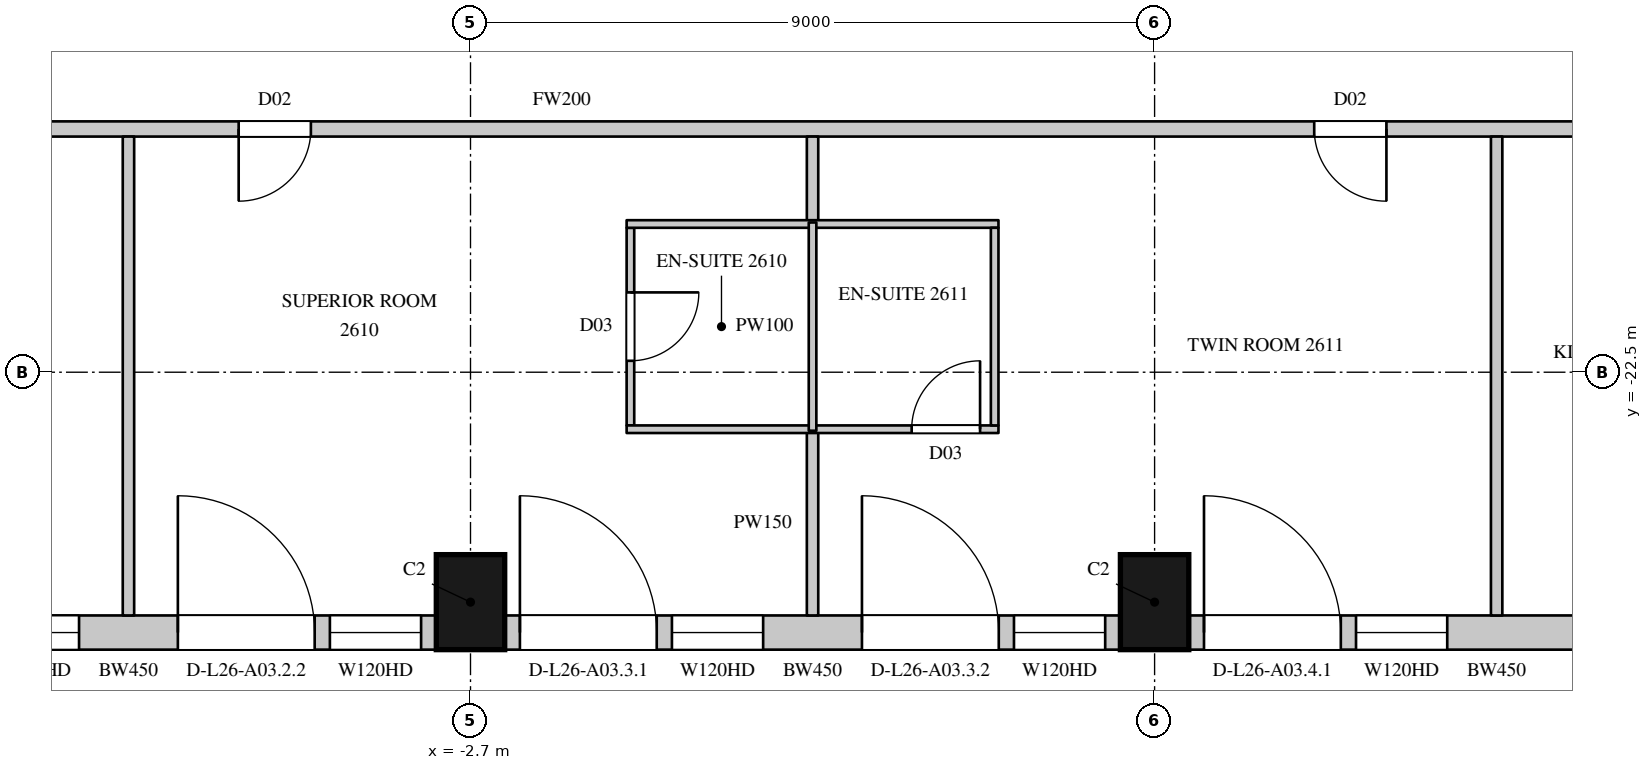
"""IFC4 building model, lengths in metres.
Left out: names, types, materials, properties, quantities, classifications, styles, units other than length and angle.
Written with IfcOpenShell. Run it as: python <this file> out.ifc"""

import sys

from ifc_helpers import new_model, si_unit, direction, frame, frame_2d, origin, origin_2d, place, context, subcontext, project, spatial, rectangle, extrude, element, fill, save


model = new_model("IFC4")
c1 = context("Model", 3, precision=1e-05, world=origin(), true_north=direction((0.0, 1.0)))
c2 = subcontext(c1, "Body", "Model", "MODEL_VIEW")
j1 = project(units=[si_unit("LENGTHUNIT", "METRE"), si_unit("PLANEANGLEUNIT", "RADIAN")], contexts=[c1])
p1 = place(None, origin())
s1 = spatial("IfcSite", under=j1, at=p1, CompositionType="ELEMENT")
p2 = place(p1, origin())
s2 = spatial("IfcBuilding", under=s1, at=p2, CompositionType="ELEMENT")
p3 = place(p2, frame((0.0, 0.0, 123.9)))
s3 = spatial("IfcBuildingStorey", under=s2, at=p3, CompositionType="ELEMENT", Elevation=123.9)
for number, where, z_axis, x_axis in (
    (1, (-2.7, -25.525, 0.0), (0.0, 0.0, 1.0), (1.0, 0.0, 0.0)),
    (2, (6.3, -25.525, 0.0), (0.0, 0.0, 1.0), (1.0, 0.0, 0.0)),
):
    element("IfcColumn", number, at=place(p3, frame(where, z_axis=z_axis, x_axis=x_axis)), inside=s3, PredefinedType="COLUMN", context=c2, shape_type="SweptSolid", body=[
        extrude(rectangle(XDim=0.9, YDim=1.25, at=origin_2d()), origin(), (0.0, 0.0, 1.0), 3.6),
    ])
p4 = place(p3, frame((-11.25, -25.925, 0.0), z_axis=(0.0, 0.0, 1.0), x_axis=(1.0, 0.0, 0.0)))
e3 = element("IfcWall", 3, at=p4, inside=s3, PredefinedType="SOLIDWALL", context=c2, shape_type="SweptSolid", body=[
    extrude(rectangle(XDim=8.1, YDim=0.45, at=frame_2d((4.05, 0.0))), origin(), (0.0, 0.0, 1.0), 3.3),
])
p5 = place(p4, frame((0.2, 0.0, 0.0)))
e4 = element("IfcOpeningElement", 4, at=p5, cuts=e3, PredefinedType="OPENING", context=c2, shape_type="SweptSolid", body=[
    extrude(rectangle(XDim=1.8, YDim=2.4, at=frame_2d((0.9, 1.2))), frame((0.0, 0.235, 0.0), z_axis=(0.0, -1.0, 0.0), x_axis=(1.0, 0.0, 0.0)), (0.0, 0.0, 1.0), 0.47),
])
p6 = place(p4, frame((2.2, 0.0, 1.05)))
e5 = element("IfcOpeningElement", 5, at=p6, cuts=e3, PredefinedType="OPENING", context=c2, shape_type="SweptSolid", body=[
    extrude(rectangle(XDim=1.2, YDim=2.0, at=frame_2d((0.6, 1.0))), frame((0.0, 0.235, 0.0), z_axis=(0.0, -1.0, 0.0), x_axis=(1.0, 0.0, 0.0)), (0.0, 0.0, 1.0), 0.47),
])
p7 = place(p4, frame((4.7, 0.0, 0.0)))
e6 = element("IfcOpeningElement", 6, at=p7, cuts=e3, PredefinedType="OPENING", context=c2, shape_type="SweptSolid", body=[
    extrude(rectangle(XDim=1.8, YDim=2.4, at=frame_2d((0.9, 1.2))), frame((0.0, 0.235, 0.0), z_axis=(0.0, -1.0, 0.0), x_axis=(1.0, 0.0, 0.0)), (0.0, 0.0, 1.0), 0.47),
])
p8 = place(p4, frame((6.7, 0.0, 1.05)))
e7 = element("IfcOpeningElement", 7, at=p8, cuts=e3, PredefinedType="OPENING", context=c2, shape_type="SweptSolid", body=[
    extrude(rectangle(XDim=1.2, YDim=2.0, at=frame_2d((0.6, 1.0))), frame((0.0, 0.235, 0.0), z_axis=(0.0, -1.0, 0.0), x_axis=(1.0, 0.0, 0.0)), (0.0, 0.0, 1.0), 0.47),
])
p9 = place(p3, frame((-2.25, -25.925, 0.0), z_axis=(0.0, 0.0, 1.0), x_axis=(1.0, 0.0, 0.0)))
e8 = element("IfcWall", 8, at=p9, inside=s3, PredefinedType="SOLIDWALL", context=c2, shape_type="SweptSolid", body=[
    extrude(rectangle(XDim=8.1, YDim=0.45, at=frame_2d((4.05, 0.0))), origin(), (0.0, 0.0, 1.0), 3.3),
])
p10 = place(p9, frame((0.2, 0.0, 0.0)))
e9 = element("IfcOpeningElement", 9, at=p10, cuts=e8, PredefinedType="OPENING", context=c2, shape_type="SweptSolid", body=[
    extrude(rectangle(XDim=1.8, YDim=2.4, at=frame_2d((0.9, 1.2))), frame((0.0, 0.235, 0.0), z_axis=(0.0, -1.0, 0.0), x_axis=(1.0, 0.0, 0.0)), (0.0, 0.0, 1.0), 0.47),
])
p11 = place(p9, frame((2.2, 0.0, 1.05)))
e10 = element("IfcOpeningElement", 10, at=p11, cuts=e8, PredefinedType="OPENING", context=c2, shape_type="SweptSolid", body=[
    extrude(rectangle(XDim=1.2, YDim=2.0, at=frame_2d((0.6, 1.0))), frame((0.0, 0.235, 0.0), z_axis=(0.0, -1.0, 0.0), x_axis=(1.0, 0.0, 0.0)), (0.0, 0.0, 1.0), 0.47),
])
p12 = place(p9, frame((4.7, 0.0, 0.0)))
e11 = element("IfcOpeningElement", 11, at=p12, cuts=e8, PredefinedType="OPENING", context=c2, shape_type="SweptSolid", body=[
    extrude(rectangle(XDim=1.8, YDim=2.4, at=frame_2d((0.9, 1.2))), frame((0.0, 0.235, 0.0), z_axis=(0.0, -1.0, 0.0), x_axis=(1.0, 0.0, 0.0)), (0.0, 0.0, 1.0), 0.47),
])
p13 = place(p9, frame((6.7, 0.0, 1.05)))
e12 = element("IfcOpeningElement", 12, at=p13, cuts=e8, PredefinedType="OPENING", context=c2, shape_type="SweptSolid", body=[
    extrude(rectangle(XDim=1.2, YDim=2.0, at=frame_2d((0.6, 1.0))), frame((0.0, 0.235, 0.0), z_axis=(0.0, -1.0, 0.0), x_axis=(1.0, 0.0, 0.0)), (0.0, 0.0, 1.0), 0.47),
])
p14 = place(p3, frame((6.75, -25.925, 0.0), z_axis=(0.0, 0.0, 1.0), x_axis=(1.0, 0.0, 0.0)))
e13 = element("IfcWall", 13, at=p14, inside=s3, PredefinedType="SOLIDWALL", context=c2, shape_type="SweptSolid", body=[
    extrude(rectangle(XDim=8.1, YDim=0.45, at=frame_2d((4.05, 0.0))), origin(), (0.0, 0.0, 1.0), 3.3),
])
p15 = place(p14, frame((0.2, 0.0, 0.0)))
e14 = element("IfcOpeningElement", 14, at=p15, cuts=e13, PredefinedType="OPENING", context=c2, shape_type="SweptSolid", body=[
    extrude(rectangle(XDim=1.8, YDim=2.4, at=frame_2d((0.9, 1.2))), frame((0.0, 0.235, 0.0), z_axis=(0.0, -1.0, 0.0), x_axis=(1.0, 0.0, 0.0)), (0.0, 0.0, 1.0), 0.47),
])
p16 = place(p14, frame((2.2, 0.0, 1.05)))
e15 = element("IfcOpeningElement", 15, at=p16, cuts=e13, PredefinedType="OPENING", context=c2, shape_type="SweptSolid", body=[
    extrude(rectangle(XDim=1.2, YDim=2.0, at=frame_2d((0.6, 1.0))), frame((0.0, 0.235, 0.0), z_axis=(0.0, -1.0, 0.0), x_axis=(1.0, 0.0, 0.0)), (0.0, 0.0, 1.0), 0.47),
])
p17 = place(p14, frame((5.4, 0.0, 0.0)))
e16 = element("IfcOpeningElement", 16, at=p17, cuts=e13, PredefinedType="OPENING", context=c2, shape_type="SweptSolid", body=[
    extrude(rectangle(XDim=1.8, YDim=2.4, at=frame_2d((0.9, 1.2))), frame((0.0, 0.235, 0.0), z_axis=(0.0, -1.0, 0.0), x_axis=(1.0, 0.0, 0.0)), (0.0, 0.0, 1.0), 0.47),
])
p18 = place(p3, frame((-20.8, -19.3, 0.0), z_axis=(0.0, 0.0, 1.0), x_axis=(1.0, 0.0, 0.0)))
e17 = element("IfcWall", 17, at=p18, inside=s3, PredefinedType="PARTITIONING", context=c2, shape_type="SweptSolid", body=[
    extrude(rectangle(XDim=38.6, YDim=0.2, at=frame_2d((19.3, 0.0))), origin(), (0.0, 0.0, 1.0), 3.3),
])
p19 = place(p18, frame((11.2, 0.0, 0.0)))
e18 = element("IfcOpeningElement", 18, at=p19, cuts=e17, PredefinedType="OPENING", context=c2, shape_type="SweptSolid", body=[
    extrude(rectangle(XDim=0.95, YDim=2.2, at=frame_2d((0.475, 1.1))), frame((0.0, 0.11, 0.0), z_axis=(0.0, -1.0, 0.0), x_axis=(1.0, 0.0, 0.0)), (0.0, 0.0, 1.0), 0.22),
])
p20 = place(p18, frame((15.05, 0.0, 0.0)))
e19 = element("IfcOpeningElement", 19, at=p20, cuts=e17, PredefinedType="OPENING", context=c2, shape_type="SweptSolid", body=[
    extrude(rectangle(XDim=0.95, YDim=2.2, at=frame_2d((0.475, 1.1))), frame((0.0, 0.11, 0.0), z_axis=(0.0, -1.0, 0.0), x_axis=(1.0, 0.0, 0.0)), (0.0, 0.0, 1.0), 0.22),
])
p21 = place(p18, frame((29.2, 0.0, 0.0)))
e20 = element("IfcOpeningElement", 20, at=p21, cuts=e17, PredefinedType="OPENING", context=c2, shape_type="SweptSolid", body=[
    extrude(rectangle(XDim=0.95, YDim=2.2, at=frame_2d((0.475, 1.1))), frame((0.0, 0.11, 0.0), z_axis=(0.0, -1.0, 0.0), x_axis=(1.0, 0.0, 0.0)), (0.0, 0.0, 1.0), 0.22),
])
p22 = place(p18, frame((33.05, 0.0, 0.0)))
e21 = element("IfcOpeningElement", 21, at=p22, cuts=e17, PredefinedType="OPENING", context=c2, shape_type="SweptSolid", body=[
    extrude(rectangle(XDim=0.95, YDim=2.2, at=frame_2d((0.475, 1.1))), frame((0.0, 0.11, 0.0), z_axis=(0.0, -1.0, 0.0), x_axis=(1.0, 0.0, 0.0)), (0.0, 0.0, 1.0), 0.22),
])
p23 = place(p3, frame((-7.2, -25.7, 0.0), z_axis=(0.0, 0.0, 1.0), x_axis=(0.0, 1.0, 0.0)))
e22 = element("IfcWall", 22, at=p23, inside=s3, PredefinedType="PARTITIONING", context=c2, shape_type="SweptSolid", body=[
    extrude(rectangle(XDim=6.3, YDim=0.15, at=frame_2d((3.15, 0.0))), origin(), (0.0, 0.0, 1.0), 2.65),
])
p24 = place(p3, frame((1.8, -25.7, 0.0), z_axis=(0.0, 0.0, 1.0), x_axis=(0.0, 1.0, 0.0)))
e23 = element("IfcWall", 23, at=p24, inside=s3, PredefinedType="PARTITIONING", context=c2, shape_type="SweptSolid", body=[
    extrude(rectangle(XDim=2.43, YDim=0.15, at=frame_2d((1.215, 0.0))), origin(), (0.0, 0.0, 1.0), 2.65),
])
p25 = place(p3, frame((1.8, -20.53, 0.0), z_axis=(0.0, 0.0, 1.0), x_axis=(0.0, 1.0, 0.0)))
e24 = element("IfcWall", 24, at=p25, inside=s3, PredefinedType="PARTITIONING", context=c2, shape_type="SweptSolid", body=[
    extrude(rectangle(XDim=1.13, YDim=0.15, at=frame_2d((0.565, 0.0))), origin(), (0.0, 0.0, 1.0), 2.65),
])
p26 = place(p3, frame((10.8, -25.7, 0.0), z_axis=(0.0, 0.0, 1.0), x_axis=(0.0, 1.0, 0.0)))
e25 = element("IfcWall", 25, at=p26, inside=s3, PredefinedType="PARTITIONING", context=c2, shape_type="SweptSolid", body=[
    extrude(rectangle(XDim=6.3, YDim=0.15, at=frame_2d((3.15, 0.0))), origin(), (0.0, 0.0, 1.0), 2.65),
])
p27 = place(p3, frame((-0.596, -23.2, 0.0), z_axis=(0.0, 0.0, 1.0), x_axis=(0.0, 1.0, 0.0)))
e26 = element("IfcWall", 26, at=p27, inside=s3, PredefinedType="PARTITIONING", context=c2, shape_type="SweptSolid", body=[
    extrude(rectangle(XDim=2.6, YDim=0.1, at=frame_2d((1.3, 0.0))), origin(), (0.0, 0.0, 1.0), 3.3),
])
p28 = place(p27, frame((0.85, 0.0, 0.0)))
e27 = element("IfcOpeningElement", 27, at=p28, cuts=e26, PredefinedType="OPENING", context=c2, shape_type="SweptSolid", body=[
    extrude(rectangle(XDim=0.9, YDim=2.2, at=frame_2d((0.45, 1.1))), frame((0.0, 0.06, 0.0), z_axis=(0.0, -1.0, 0.0), x_axis=(1.0, 0.0, 0.0)), (0.0, 0.0, 1.0), 0.12),
])
p29 = place(p3, frame((-0.646, -23.25, 0.0), z_axis=(0.0, 0.0, 1.0), x_axis=(1.0, 0.0, 0.0)))
e28 = element("IfcWall", 28, at=p29, inside=s3, PredefinedType="PARTITIONING", context=c2, shape_type="SweptSolid", body=[
    extrude(rectangle(XDim=4.892, YDim=0.1, at=frame_2d((2.446, 0.0))), origin(), (0.0, 0.0, 1.0), 3.3),
])
p30 = place(p29, frame((3.75, 0.0, 0.0)))
e29 = element("IfcOpeningElement", 29, at=p30, cuts=e28, PredefinedType="OPENING", context=c2, shape_type="SweptSolid", body=[
    extrude(rectangle(XDim=0.9, YDim=2.2, at=frame_2d((0.45, 1.1))), frame((0.0, 0.06, 0.0), z_axis=(0.0, -1.0, 0.0), x_axis=(1.0, 0.0, 0.0)), (0.0, 0.0, 1.0), 0.12),
])
p31 = place(p3, frame((-0.646, -20.55, 0.0), z_axis=(0.0, 0.0, 1.0), x_axis=(1.0, 0.0, 0.0)))
e30 = element("IfcWall", 30, at=p31, inside=s3, PredefinedType="PARTITIONING", context=c2, shape_type="SweptSolid", body=[
    extrude(rectangle(XDim=4.892, YDim=0.1, at=frame_2d((2.446, 0.0))), origin(), (0.0, 0.0, 1.0), 3.3),
])
p32 = place(p3, frame((1.8, -23.27, 0.0), z_axis=(0.0, 0.0, 1.0), x_axis=(0.0, 1.0, 0.0)))
e31 = element("IfcWall", 31, at=p32, inside=s3, PredefinedType="PARTITIONING", context=c2, shape_type="SweptSolid", body=[
    extrude(rectangle(XDim=2.74, YDim=0.1, at=frame_2d((1.37, 0.0))), origin(), (0.0, 0.0, 1.0), 2.65),
])
p33 = place(p3, frame((4.196, -23.2, 0.0), z_axis=(0.0, 0.0, 1.0), x_axis=(0.0, 1.0, 0.0)))
e32 = element("IfcWall", 32, at=p33, inside=s3, PredefinedType="PARTITIONING", context=c2, shape_type="SweptSolid", body=[
    extrude(rectangle(XDim=2.6, YDim=0.1, at=frame_2d((1.3, 0.0))), origin(), (0.0, 0.0, 1.0), 3.3),
])
p34 = place(p6, origin())
e33 = element("IfcWindow", 33, at=p34, inside=s3, PartitioningType="SINGLE_PANEL", PredefinedType="WINDOW", context=c2, shape_type="SweptSolid", body=[
    extrude(rectangle(XDim=1.2, YDim=2.0, at=frame_2d((0.6, 1.0))), frame((0.0, 0.135, 0.0), z_axis=(0.0, -1.0, 0.0), x_axis=(1.0, 0.0, 0.0)), (0.0, 0.0, 1.0), 0.06),
])
fill(e5, e33)
p35 = place(p7, origin())
e34 = element("IfcDoor", 34, at=p35, inside=s3, OperationType="SLIDING_TO_LEFT", PredefinedType="DOOR", context=c2, shape_type="SweptSolid", body=[
    extrude(rectangle(XDim=1.8, YDim=2.4, at=frame_2d((0.9, 1.2))), frame((0.0, 0.13, 0.0), z_axis=(0.0, -1.0, 0.0), x_axis=(1.0, 0.0, 0.0)), (0.0, 0.0, 1.0), 0.05),
])
fill(e6, e34)
p36 = place(p8, origin())
e35 = element("IfcWindow", 35, at=p36, inside=s3, PartitioningType="SINGLE_PANEL", PredefinedType="WINDOW", context=c2, shape_type="SweptSolid", body=[
    extrude(rectangle(XDim=1.2, YDim=2.0, at=frame_2d((0.6, 1.0))), frame((0.0, 0.135, 0.0), z_axis=(0.0, -1.0, 0.0), x_axis=(1.0, 0.0, 0.0)), (0.0, 0.0, 1.0), 0.06),
])
fill(e7, e35)
p37 = place(p10, origin())
e36 = element("IfcDoor", 36, at=p37, inside=s3, OperationType="SLIDING_TO_LEFT", PredefinedType="DOOR", context=c2, shape_type="SweptSolid", body=[
    extrude(rectangle(XDim=1.8, YDim=2.4, at=frame_2d((0.9, 1.2))), frame((0.0, 0.13, 0.0), z_axis=(0.0, -1.0, 0.0), x_axis=(1.0, 0.0, 0.0)), (0.0, 0.0, 1.0), 0.05),
])
fill(e9, e36)
p38 = place(p11, origin())
e37 = element("IfcWindow", 37, at=p38, inside=s3, PartitioningType="SINGLE_PANEL", PredefinedType="WINDOW", context=c2, shape_type="SweptSolid", body=[
    extrude(rectangle(XDim=1.2, YDim=2.0, at=frame_2d((0.6, 1.0))), frame((0.0, 0.135, 0.0), z_axis=(0.0, -1.0, 0.0), x_axis=(1.0, 0.0, 0.0)), (0.0, 0.0, 1.0), 0.06),
])
fill(e10, e37)
p39 = place(p12, origin())
e38 = element("IfcDoor", 38, at=p39, inside=s3, OperationType="SLIDING_TO_LEFT", PredefinedType="DOOR", context=c2, shape_type="SweptSolid", body=[
    extrude(rectangle(XDim=1.8, YDim=2.4, at=frame_2d((0.9, 1.2))), frame((0.0, 0.13, 0.0), z_axis=(0.0, -1.0, 0.0), x_axis=(1.0, 0.0, 0.0)), (0.0, 0.0, 1.0), 0.05),
])
fill(e11, e38)
p40 = place(p13, origin())
e39 = element("IfcWindow", 39, at=p40, inside=s3, PartitioningType="SINGLE_PANEL", PredefinedType="WINDOW", context=c2, shape_type="SweptSolid", body=[
    extrude(rectangle(XDim=1.2, YDim=2.0, at=frame_2d((0.6, 1.0))), frame((0.0, 0.135, 0.0), z_axis=(0.0, -1.0, 0.0), x_axis=(1.0, 0.0, 0.0)), (0.0, 0.0, 1.0), 0.06),
])
fill(e12, e39)
p41 = place(p15, origin())
e40 = element("IfcDoor", 40, at=p41, inside=s3, OperationType="SLIDING_TO_LEFT", PredefinedType="DOOR", context=c2, shape_type="SweptSolid", body=[
    extrude(rectangle(XDim=1.8, YDim=2.4, at=frame_2d((0.9, 1.2))), frame((0.0, 0.13, 0.0), z_axis=(0.0, -1.0, 0.0), x_axis=(1.0, 0.0, 0.0)), (0.0, 0.0, 1.0), 0.05),
])
fill(e14, e40)
p42 = place(p16, origin())
e41 = element("IfcWindow", 41, at=p42, inside=s3, PartitioningType="SINGLE_PANEL", PredefinedType="WINDOW", context=c2, shape_type="SweptSolid", body=[
    extrude(rectangle(XDim=1.2, YDim=2.0, at=frame_2d((0.6, 1.0))), frame((0.0, 0.135, 0.0), z_axis=(0.0, -1.0, 0.0), x_axis=(1.0, 0.0, 0.0)), (0.0, 0.0, 1.0), 0.06),
])
fill(e15, e41)
p43 = place(p20, origin())
e42 = element("IfcDoor", 42, at=p43, inside=s3, OperationType="SINGLE_SWING_RIGHT", PredefinedType="DOOR", context=c2, shape_type="SweptSolid", body=[
    extrude(rectangle(XDim=0.95, YDim=2.2, at=frame_2d((0.475, 1.1))), frame((0.0, 0.025, 0.0), z_axis=(0.0, -1.0, 0.0), x_axis=(1.0, 0.0, 0.0)), (0.0, 0.0, 1.0), 0.05),
])
fill(e19, e42)
p44 = place(p28, origin())
e43 = element("IfcDoor", 43, at=p44, inside=s3, OperationType="SINGLE_SWING_LEFT", PredefinedType="DOOR", context=c2, shape_type="SweptSolid", body=[
    extrude(rectangle(XDim=0.9, YDim=2.2, at=frame_2d((0.45, 1.1))), frame((0.0, 0.025, 0.0), z_axis=(0.0, -1.0, 0.0), x_axis=(1.0, 0.0, 0.0)), (0.0, 0.0, 1.0), 0.05),
])
fill(e27, e43)
p45 = place(p21, origin())
e44 = element("IfcDoor", 44, at=p45, inside=s3, OperationType="SINGLE_SWING_LEFT", PredefinedType="DOOR", context=c2, shape_type="SweptSolid", body=[
    extrude(rectangle(XDim=0.95, YDim=2.2, at=frame_2d((0.475, 1.1))), frame((0.0, 0.025, 0.0), z_axis=(0.0, -1.0, 0.0), x_axis=(1.0, 0.0, 0.0)), (0.0, 0.0, 1.0), 0.05),
])
fill(e20, e44)
p46 = place(p30, origin())
e45 = element("IfcDoor", 45, at=p46, inside=s3, OperationType="SINGLE_SWING_RIGHT", PredefinedType="DOOR", context=c2, shape_type="SweptSolid", body=[
    extrude(rectangle(XDim=0.9, YDim=2.2, at=frame_2d((0.45, 1.1))), frame((0.0, 0.025, 0.0), z_axis=(0.0, -1.0, 0.0), x_axis=(1.0, 0.0, 0.0)), (0.0, 0.0, 1.0), 0.05),
])
fill(e29, e45)
save(model, sys.argv[1])
